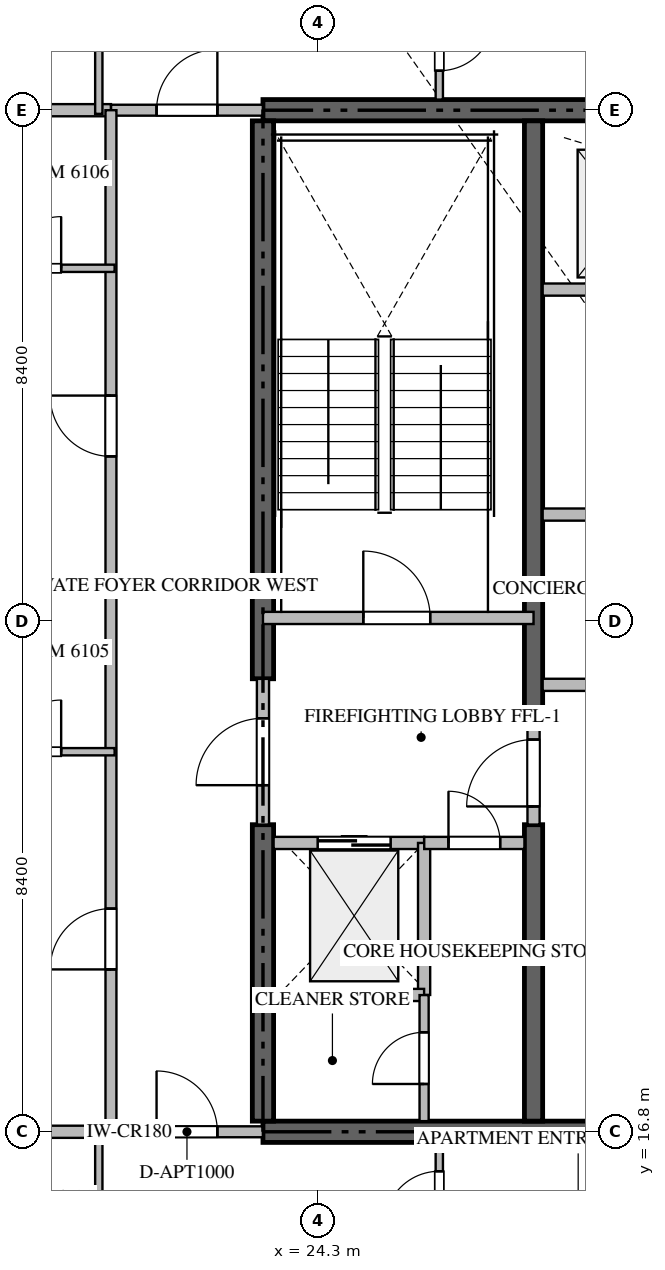
"""IFC4 building model, lengths in metres.
Left out: names, types, materials, properties, quantities, classifications, styles, units other than length and angle.
Written with IfcOpenShell. Run it as: python <this file> out.ifc"""

import sys

from ifc_helpers import new_model, si_unit, direction, frame, frame_2d, origin, place, context, subcontext, project, spatial, rectangle, extrude, source, transform, mapped, element, fill, save


model = new_model("IFC4")
c1 = context("Model", 3, precision=1e-05, world=origin(), true_north=direction((0.0, 1.0)))
c2 = subcontext(c1, "Body", "Model", "MODEL_VIEW")
j1 = project(units=[si_unit("LENGTHUNIT", "METRE"), si_unit("PLANEANGLEUNIT", "RADIAN")], contexts=[c1])
p1 = place(None, origin())
s1 = spatial("IfcSite", under=j1, at=p1, CompositionType="ELEMENT")
p2 = place(p1, origin())
s2 = spatial("IfcBuilding", under=s1, at=p2, CompositionType="ELEMENT")
p3 = place(p2, frame((0.0, 0.0, 245.1)))
s3 = spatial("IfcBuildingStorey", under=s2, at=p3, CompositionType="ELEMENT", Elevation=245.1)
for number, where, z_axis, x_axis in (
    (1, (23.4, 16.8, -0.26), (0.0, 0.0, 1.0), (1.0, 0.0, 0.0)),
    (2, (41.4, 33.6, -0.26), (0.0, 0.0, 1.0), (-1.0, 0.0, 0.0)),
):
    element("IfcWall", number, at=place(p3, frame(where, z_axis=z_axis, x_axis=x_axis)), inside=s3, PredefinedType="SHEAR", context=c2, shape_type="SweptSolid", body=[
        extrude(rectangle(XDim=18.0, YDim=0.35, at=frame_2d((9.0, 0.0))), origin(), (0.0, 0.0, 1.0), 3.848),
    ])
p4 = place(p3, frame((23.4, 16.975, -0.26), z_axis=(0.0, 0.0, 1.0), x_axis=(0.0, 1.0, 0.0)))
e3 = element("IfcWall", 3, at=p4, inside=s3, PredefinedType="SHEAR", context=c2, shape_type="SweptSolid", body=[
    extrude(rectangle(XDim=4.875, YDim=0.35, at=frame_2d((2.438, 0.0))), origin(), (0.0, 0.0, 1.0), 3.848),
])
p5 = place(p3, frame((23.4, 24.25, -0.26), z_axis=(0.0, 0.0, 1.0), x_axis=(0.0, 1.0, 0.0)))
e4 = element("IfcWall", 4, at=p5, inside=s3, PredefinedType="SHEAR", context=c2, shape_type="SweptSolid", body=[
    extrude(rectangle(XDim=9.175, YDim=0.35, at=frame_2d((4.587, 0.0))), origin(), (0.0, 0.0, 1.0), 3.848),
])
p6 = place(p3, frame((27.85, 16.975, -0.26), z_axis=(0.0, 0.0, 1.0), x_axis=(0.0, 1.0, 0.0)))
e5 = element("IfcWall", 5, at=p6, inside=s3, PredefinedType="SHEAR", context=c2, shape_type="SweptSolid", body=[
    extrude(rectangle(XDim=4.875, YDim=0.3, at=frame_2d((2.438, 0.0))), origin(), (0.0, 0.0, 1.0), 3.848),
])
p7 = place(p3, frame((27.85, 23.55, -0.26), z_axis=(0.0, 0.0, 1.0), x_axis=(0.0, 1.0, 0.0)))
e6 = element("IfcWall", 6, at=p7, inside=s3, PredefinedType="SHEAR", context=c2, shape_type="SweptSolid", body=[
    extrude(rectangle(XDim=9.875, YDim=0.3, at=frame_2d((4.938, 0.0))), origin(), (0.0, 0.0, 1.0), 3.848),
])
p8 = place(p3, frame((23.4, 25.25, 0.0), z_axis=(0.0, 0.0, 1.0), x_axis=(1.0, 0.0, 0.0)))
e7 = element("IfcWall", 7, at=p8, inside=s3, PredefinedType="STANDARD", context=c2, shape_type="SweptSolid", body=[
    extrude(rectangle(XDim=4.45, YDim=0.2, at=frame_2d((2.225, 0.0))), origin(), (0.0, 0.0, 1.0), 3.59),
])
p9 = place(p8, frame((1.65, 0.0, 0.0)))
e8 = element("IfcOpeningElement", 8, at=p9, cuts=e7, PredefinedType="OPENING", context=c2, shape_type="SweptSolid", body=[
    extrude(rectangle(XDim=1.1, YDim=2.15, at=frame_2d((0.55, 1.075))), frame((0.0, 0.11, 0.0), z_axis=(0.0, -1.0, 0.0), x_axis=(1.0, 0.0, 0.0)), (0.0, 0.0, 1.0), 0.22),
])
p10 = place(p3, frame((23.575, 21.55, 0.0), z_axis=(0.0, 0.0, 1.0), x_axis=(1.0, 0.0, 0.0)))
e9 = element("IfcWall", 9, at=p10, inside=s3, PredefinedType="STANDARD", context=c2, shape_type="SweptSolid", body=[
    extrude(rectangle(XDim=2.475, YDim=0.2, at=frame_2d((1.238, 0.0))), origin(), (0.0, 0.0, 1.0), 3.59),
])
p11 = place(p10, frame((0.725, 0.0, 0.0)))
e10 = element("IfcOpeningElement", 10, at=p11, cuts=e9, PredefinedType="OPENING", context=c2, shape_type="SweptSolid", body=[
    extrude(rectangle(XDim=1.2, YDim=2.2, at=frame_2d((0.6, 1.1))), frame((0.0, 0.11, 0.0), z_axis=(0.0, -1.0, 0.0), x_axis=(1.0, 0.0, 0.0)), (0.0, 0.0, 1.0), 0.22),
])
p12 = place(p3, frame((28.0, 30.65, 0.0), z_axis=(0.0, 0.0, 1.0), x_axis=(1.0, 0.0, 0.0)))
e11 = element("IfcWall", 11, at=p12, inside=s3, PredefinedType="STANDARD", context=c2, shape_type="SweptSolid", body=[
    extrude(rectangle(XDim=2.55, YDim=0.2, at=frame_2d((1.275, 0.0))), origin(), (0.0, 0.0, 1.0), 3.59),
])
p13 = place(p12, frame((0.85, 0.0, 0.0)))
e12 = element("IfcOpeningElement", 12, at=p13, cuts=e11, PredefinedType="OPENING", context=c2, shape_type="SweptSolid", body=[
    extrude(rectangle(XDim=1.1, YDim=2.2, at=frame_2d((0.55, 1.1))), frame((0.0, 0.11, 0.0), z_axis=(0.0, -1.0, 0.0), x_axis=(1.0, 0.0, 0.0)), (0.0, 0.0, 1.0), 0.22),
])
p14 = place(p3, frame((26.05, 19.05, 0.0), z_axis=(0.0, 0.0, 1.0), x_axis=(0.0, 1.0, 0.0)))
e13 = element("IfcWall", 13, at=p14, inside=s3, PredefinedType="STANDARD", context=c2, shape_type="SweptSolid", body=[
    extrude(rectangle(XDim=2.5, YDim=0.2, at=frame_2d((1.25, 0.0))), origin(), (0.0, 0.0, 1.0), 3.59),
])
p15 = place(p3, frame((23.575, 19.05, 0.0), z_axis=(0.0, 0.0, 1.0), x_axis=(1.0, 0.0, 0.0)))
e14 = element("IfcWall", 14, at=p15, inside=s3, PredefinedType="STANDARD", context=c2, shape_type="SweptSolid", body=[
    extrude(rectangle(XDim=2.475, YDim=0.2, at=frame_2d((1.238, 0.0))), origin(), (0.0, 0.0, 1.0), 3.59),
])
p16 = place(p3, frame((26.052, 21.55, 0.0), z_axis=(0.0, 0.0, 1.0), x_axis=(1.0, 0.0, 0.0)))
e15 = element("IfcWall", 15, at=p16, inside=s3, PredefinedType="STANDARD", context=c2, shape_type="SweptSolid", body=[
    extrude(rectangle(XDim=1.648, YDim=0.2, at=frame_2d((0.824, 0.0))), origin(), (0.0, 0.0, 1.0), 3.59),
])
p17 = place(p16, frame((0.399, 0.0, 0.0)))
e16 = element("IfcOpeningElement", 16, at=p17, cuts=e15, PredefinedType="OPENING", context=c2, shape_type="SweptSolid", body=[
    extrude(rectangle(XDim=0.85, YDim=2.1, at=frame_2d((0.425, 1.05))), frame((0.0, 0.11, 0.0), z_axis=(0.0, -1.0, 0.0), x_axis=(1.0, 0.0, 0.0)), (0.0, 0.0, 1.0), 0.22),
])
p18 = place(p3, frame((23.4, 21.852, 0.0), z_axis=(0.0, 0.0, 1.0), x_axis=(0.0, 1.0, 0.0)))
e17 = element("IfcWall", 17, at=p18, inside=s3, PredefinedType="STANDARD", context=c2, shape_type="SweptSolid", body=[
    extrude(rectangle(XDim=2.396, YDim=0.2, at=frame_2d((1.198, 0.0))), origin(), (0.0, 0.0, 1.0), 3.59),
])
p19 = place(p18, frame((0.648, 0.0, 0.0)))
e18 = element("IfcOpeningElement", 18, at=p19, cuts=e17, PredefinedType="OPENING", context=c2, shape_type="SweptSolid", body=[
    extrude(rectangle(XDim=1.1, YDim=2.15, at=frame_2d((0.55, 1.075))), frame((0.0, 0.11, 0.0), z_axis=(0.0, -1.0, 0.0), x_axis=(1.0, 0.0, 0.0)), (0.0, 0.0, 1.0), 0.22),
])
p20 = place(p3, frame((27.85, 21.852, 0.0), z_axis=(0.0, 0.0, 1.0), x_axis=(0.0, 1.0, 0.0)))
e19 = element("IfcWall", 19, at=p20, inside=s3, PredefinedType="STANDARD", context=c2, shape_type="SweptSolid", body=[
    extrude(rectangle(XDim=1.696, YDim=0.2, at=frame_2d((0.848, 0.0))), origin(), (0.0, 0.0, 1.0), 3.59),
])
p21 = place(p20, frame((0.298, 0.0, 0.0)))
e20 = element("IfcOpeningElement", 20, at=p21, cuts=e19, PredefinedType="OPENING", context=c2, shape_type="SweptSolid", body=[
    extrude(rectangle(XDim=1.1, YDim=2.15, at=frame_2d((0.55, 1.075))), frame((0.0, 0.11, 0.0), z_axis=(0.0, -1.0, 0.0), x_axis=(1.0, 0.0, 0.0)), (0.0, 0.0, 1.0), 0.22),
])
p22 = place(p3, frame((26.05, 16.975, 0.0), z_axis=(0.0, 0.0, 1.0), x_axis=(0.0, 1.0, 0.0)))
e21 = element("IfcWall", 21, at=p22, inside=s3, PredefinedType="PARTITIONING", context=c2, shape_type="SweptSolid", body=[
    extrude(rectangle(XDim=2.073, YDim=0.15, at=frame_2d((1.037, 0.0))), origin(), (0.0, 0.0, 1.0), 3.59),
])
p23 = place(p22, frame((0.611, 0.0, 0.0)))
e22 = element("IfcOpeningElement", 22, at=p23, cuts=e21, PredefinedType="OPENING", context=c2, shape_type="SweptSolid", body=[
    extrude(rectangle(XDim=0.85, YDim=2.1, at=frame_2d((0.425, 1.05))), frame((0.0, 0.085, 0.0), z_axis=(0.0, -1.0, 0.0), x_axis=(1.0, 0.0, 0.0)), (0.0, 0.0, 1.0), 0.17),
])
p24 = place(p3, frame((28.0, 19.75, 0.0), z_axis=(0.0, 0.0, 1.0), x_axis=(1.0, 0.0, 0.0)))
e23 = element("IfcWall", 23, at=p24, inside=s3, PredefinedType="STANDARD", context=c2, shape_type="SweptSolid", body=[
    extrude(rectangle(XDim=8.8, YDim=0.2, at=frame_2d((4.4, 0.0))), origin(), (0.0, 0.0, 1.0), 3.59),
])
p25 = place(p24, frame((3.95, 0.0, 0.0)))
e24 = element("IfcOpeningElement", 24, at=p25, cuts=e23, PredefinedType="OPENING", context=c2, shape_type="SweptSolid", body=[
    extrude(rectangle(XDim=0.9, YDim=2.1, at=frame_2d((0.45, 1.05))), frame((0.0, 0.11, 0.0), z_axis=(0.0, -1.0, 0.0), x_axis=(1.0, 0.0, 0.0)), (0.0, 0.0, 1.0), 0.22),
])
p26 = place(p3, frame((28.0, 26.95, 0.0), z_axis=(0.0, 0.0, 1.0), x_axis=(1.0, 0.0, 0.0)))
e25 = element("IfcWall", 25, at=p26, inside=s3, PredefinedType="STANDARD", context=c2, shape_type="SweptSolid", body=[
    extrude(rectangle(XDim=6.95, YDim=0.2, at=frame_2d((3.475, 0.0))), origin(), (0.0, 0.0, 1.0), 3.59),
])
p27 = place(p3, frame((28.0, 24.15, 0.0), z_axis=(0.0, 0.0, 1.0), x_axis=(1.0, 0.0, 0.0)))
e26 = element("IfcWall", 26, at=p27, inside=s3, PredefinedType="STANDARD", context=c2, shape_type="SweptSolid", body=[
    extrude(rectangle(XDim=3.45, YDim=0.2, at=frame_2d((1.725, 0.0))), origin(), (0.0, 0.0, 1.0), 3.59),
])
p28 = place(p27, frame((1.3, 0.0, 0.0)))
e27 = element("IfcOpeningElement", 27, at=p28, cuts=e26, PredefinedType="OPENING", context=c2, shape_type="SweptSolid", body=[
    extrude(rectangle(XDim=0.85, YDim=2.1, at=frame_2d((0.425, 1.05))), frame((0.0, 0.11, 0.0), z_axis=(0.0, -1.0, 0.0), x_axis=(1.0, 0.0, 0.0)), (0.0, 0.0, 1.0), 0.22),
])
p29 = place(p3, frame((7.482, 25.8, 0.0), z_axis=(0.0, 0.0, 1.0), x_axis=(1.0, 0.0, 0.0)))
e28 = element("IfcWall", 28, at=p29, inside=s3, PredefinedType="PARTITIONING", context=c2, shape_type="SweptSolid", body=[
    extrude(rectangle(XDim=13.538, YDim=0.2, at=frame_2d((6.769, 0.0))), origin(), (0.0, 0.0, 1.0), 3.59),
])
for number, where, z_axis, x_axis in (
    (29, (7.482, 16.8, 0.0), (0.0, 0.0, 1.0), (1.0, 0.0, 0.0)),
    (30, (7.482, 33.6, 0.0), (0.0, 0.0, 1.0), (1.0, 0.0, 0.0)),
):
    element("IfcWall", number, at=place(p3, frame(where, z_axis=z_axis, x_axis=x_axis)), inside=s3, PredefinedType="PARTITIONING", context=c2, shape_type="SweptSolid", body=[
        extrude(rectangle(XDim=13.418, YDim=0.2, at=frame_2d((6.709, 0.0))), origin(), (0.0, 0.0, 1.0), 3.59),
    ])
p30 = place(p3, frame((20.902, 16.8, 0.0), z_axis=(0.0, 0.0, 1.0), x_axis=(1.0, 0.0, 0.0)))
e31 = element("IfcWall", 31, at=p30, inside=s3, PredefinedType="PARTITIONING", context=c2, shape_type="SweptSolid", body=[
    extrude(rectangle(XDim=2.496, YDim=0.18, at=frame_2d((1.248, 0.0))), origin(), (0.0, 0.0, 1.0), 3.59),
])
p31 = place(p30, frame((0.748, 0.0, 0.0)))
e32 = element("IfcOpeningElement", 32, at=p31, cuts=e31, PredefinedType="OPENING", context=c2, shape_type="SweptSolid", body=[
    extrude(rectangle(XDim=1.0, YDim=2.15, at=frame_2d((0.5, 1.075))), frame((0.0, 0.1, 0.0), z_axis=(0.0, -1.0, 0.0), x_axis=(1.0, 0.0, 0.0)), (0.0, 0.0, 1.0), 0.2),
])
p32 = place(p3, frame((20.902, 33.6, 0.0), z_axis=(0.0, 0.0, 1.0), x_axis=(1.0, 0.0, 0.0)))
e33 = element("IfcWall", 33, at=p32, inside=s3, PredefinedType="PARTITIONING", context=c2, shape_type="SweptSolid", body=[
    extrude(rectangle(XDim=2.496, YDim=0.18, at=frame_2d((1.248, 0.0))), origin(), (0.0, 0.0, 1.0), 3.59),
])
p33 = place(p32, frame((0.748, 0.0, 0.0)))
e34 = element("IfcOpeningElement", 34, at=p33, cuts=e33, PredefinedType="OPENING", context=c2, shape_type="SweptSolid", body=[
    extrude(rectangle(XDim=1.0, YDim=2.15, at=frame_2d((0.5, 1.075))), frame((0.0, 0.1, 0.0), z_axis=(0.0, -1.0, 0.0), x_axis=(1.0, 0.0, 0.0)), (0.0, 0.0, 1.0), 0.2),
])
p34 = place(p3, frame((20.9, 16.8, 0.0), z_axis=(0.0, 0.0, 1.0), x_axis=(0.0, 1.0, 0.0)))
e35 = element("IfcWall", 35, at=p34, inside=s3, PredefinedType="PARTITIONING", context=c2, shape_type="SweptSolid", body=[
    extrude(rectangle(XDim=16.8, YDim=0.18, at=frame_2d((8.4, 0.0))), origin(), (0.0, 0.0, 1.0), 3.59),
])
p35 = place(p34, frame((2.67, 0.0, 0.0)))
e36 = element("IfcOpeningElement", 36, at=p35, cuts=e35, PredefinedType="OPENING", context=c2, shape_type="SweptSolid", body=[
    extrude(rectangle(XDim=1.0, YDim=2.15, at=frame_2d((0.5, 1.075))), frame((0.0, 0.1, 0.0), z_axis=(0.0, -1.0, 0.0), x_axis=(1.0, 0.0, 0.0)), (0.0, 0.0, 1.0), 0.2),
])
p36 = place(p34, frame((11.107, 0.0, 0.0)))
e37 = element("IfcOpeningElement", 37, at=p36, cuts=e35, PredefinedType="OPENING", context=c2, shape_type="SweptSolid", body=[
    extrude(rectangle(XDim=1.0, YDim=2.15, at=frame_2d((0.5, 1.075))), frame((0.0, 0.1, 0.0), z_axis=(0.0, -1.0, 0.0), x_axis=(1.0, 0.0, 0.0)), (0.0, 0.0, 1.0), 0.2),
])
p37 = place(p3, frame((20.7, 14.05, 0.0), z_axis=(0.0, 0.0, 1.0), x_axis=(0.0, 1.0, 0.0)))
e38 = element("IfcWall", 38, at=p37, inside=s3, PredefinedType="PARTITIONING", context=c2, shape_type="SweptSolid", body=[
    extrude(rectangle(XDim=2.81, YDim=0.12, at=frame_2d((1.405, 0.0))), origin(), (0.0, 0.0, 1.0), 3.59),
])
p38 = place(p3, frame((26.3, 14.65, 0.0), z_axis=(0.0, 0.0, 1.0), x_axis=(0.0, 1.0, 0.0)))
e39 = element("IfcWall", 39, at=p38, inside=s3, PredefinedType="PARTITIONING", context=c2, shape_type="SweptSolid", body=[
    extrude(rectangle(XDim=1.975, YDim=0.12, at=frame_2d((0.988, 0.0))), origin(), (0.0, 0.0, 1.0), 3.59),
])
p39 = place(p38, frame((0.601, 0.0, 0.0)))
e40 = element("IfcOpeningElement", 40, at=p39, cuts=e39, PredefinedType="OPENING", context=c2, shape_type="SweptSolid", body=[
    extrude(rectangle(XDim=0.9, YDim=2.1, at=frame_2d((0.45, 1.05))), frame((0.0, 0.07, 0.0), z_axis=(0.0, -1.0, 0.0), x_axis=(1.0, 0.0, 0.0)), (0.0, 0.0, 1.0), 0.14),
])
p40 = place(p3, frame((20.7, 36.35, 0.0), z_axis=(0.0, 0.0, 1.0), x_axis=(0.0, -1.0, 0.0)))
e41 = element("IfcWall", 41, at=p40, inside=s3, PredefinedType="PARTITIONING", context=c2, shape_type="SweptSolid", body=[
    extrude(rectangle(XDim=2.81, YDim=0.12, at=frame_2d((1.405, 0.0))), origin(), (0.0, 0.0, 1.0), 3.59),
])
p41 = place(p3, frame((26.3, 35.75, 0.0), z_axis=(0.0, 0.0, 1.0), x_axis=(0.0, -1.0, 0.0)))
e42 = element("IfcWall", 42, at=p41, inside=s3, PredefinedType="PARTITIONING", context=c2, shape_type="SweptSolid", body=[
    extrude(rectangle(XDim=1.975, YDim=0.12, at=frame_2d((0.988, 0.0))), origin(), (0.0, 0.0, 1.0), 3.59),
])
p42 = place(p41, frame((0.601, 0.0, 0.0)))
e43 = element("IfcOpeningElement", 43, at=p42, cuts=e42, PredefinedType="OPENING", context=c2, shape_type="SweptSolid", body=[
    extrude(rectangle(XDim=0.9, YDim=2.1, at=frame_2d((0.45, 1.05))), frame((0.0, 0.07, 0.0), z_axis=(0.0, -1.0, 0.0), x_axis=(1.0, 0.0, 0.0)), (0.0, 0.0, 1.0), 0.14),
])
p43 = place(p3, frame((18.352, 23.05, 0.0), z_axis=(0.0, 0.0, 1.0), x_axis=(1.0, 0.0, 0.0)))
e44 = element("IfcWall", 44, at=p43, inside=s3, PredefinedType="PARTITIONING", context=c2, shape_type="SweptSolid", body=[
    extrude(rectangle(XDim=2.608, YDim=0.12, at=frame_2d((1.304, 0.0))), origin(), (0.0, 0.0, 1.0), 3.59),
])
p44 = place(p43, frame((0.879, 0.0, 0.0)))
e45 = element("IfcOpeningElement", 45, at=p44, cuts=e44, PredefinedType="OPENING", context=c2, shape_type="SweptSolid", body=[
    extrude(rectangle(XDim=0.85, YDim=2.1, at=frame_2d((0.425, 1.05))), frame((0.0, 0.07, 0.0), z_axis=(0.0, -1.0, 0.0), x_axis=(1.0, 0.0, 0.0)), (0.0, 0.0, 1.0), 0.14),
])
p45 = place(p3, frame((18.352, 31.0, 0.0), z_axis=(0.0, 0.0, 1.0), x_axis=(1.0, 0.0, 0.0)))
e46 = element("IfcWall", 46, at=p45, inside=s3, PredefinedType="PARTITIONING", context=c2, shape_type="SweptSolid", body=[
    extrude(rectangle(XDim=2.608, YDim=0.12, at=frame_2d((1.304, 0.0))), origin(), (0.0, 0.0, 1.0), 3.59),
])
p46 = place(p45, frame((0.879, 0.0, 0.0)))
e47 = element("IfcOpeningElement", 47, at=p46, cuts=e46, PredefinedType="OPENING", context=c2, shape_type="SweptSolid", body=[
    extrude(rectangle(XDim=0.85, YDim=2.1, at=frame_2d((0.425, 1.05))), frame((0.0, 0.07, 0.0), z_axis=(0.0, -1.0, 0.0), x_axis=(1.0, 0.0, 0.0)), (0.0, 0.0, 1.0), 0.14),
])
m1 = source(origin(), c2, "Body", "SweptSolid", [
    extrude(rectangle(XDim=1.1, YDim=2.15, at=frame_2d((0.55, 1.075))), frame((0.0, 0.025, 0.0), z_axis=(0.0, -1.0, 0.0), x_axis=(1.0, 0.0, 0.0)), (0.0, 0.0, 1.0), 0.05),
])
p47 = place(p9, origin())
e48 = element("IfcDoor", 48, at=p47, inside=s3, OperationType="SINGLE_SWING_LEFT", PredefinedType="DOOR", context=c2, shape_type="MappedRepresentation", body=[
    mapped(m1, transform((0.0, 0.0, 0.0), scale=1.0)),
])
fill(e8, e48)
m2 = source(origin(), c2, "Body", "SweptSolid", [
    extrude(rectangle(XDim=1.2, YDim=2.2, at=frame_2d((0.6, 1.1))), frame((0.0, 0.025, 0.0), z_axis=(0.0, -1.0, 0.0), x_axis=(1.0, 0.0, 0.0)), (0.0, 0.0, 1.0), 0.05),
])
p48 = place(p11, origin())
e49 = element("IfcDoor", 49, at=p48, inside=s3, OperationType="DOUBLE_DOOR_SLIDING", PredefinedType="DOOR", context=c2, shape_type="MappedRepresentation", body=[
    mapped(m2, transform((0.0, 0.0, 0.0), scale=1.0)),
])
fill(e10, e49)
m3 = source(origin(), c2, "Body", "SweptSolid", [
    extrude(rectangle(XDim=0.85, YDim=2.1, at=frame_2d((0.425, 1.05))), frame((0.0, 0.025, 0.0), z_axis=(0.0, -1.0, 0.0), x_axis=(1.0, 0.0, 0.0)), (0.0, 0.0, 1.0), 0.05),
])
p49 = place(p17, origin())
e50 = element("IfcDoor", 50, at=p49, inside=s3, OperationType="SINGLE_SWING_LEFT", PredefinedType="DOOR", context=c2, shape_type="MappedRepresentation", body=[
    mapped(m3, transform((0.0, 0.0, 0.0), scale=1.0)),
])
fill(e16, e50)
p50 = place(p19, origin())
e51 = element("IfcDoor", 51, at=p50, inside=s3, OperationType="SINGLE_SWING_LEFT", PredefinedType="DOOR", context=c2, shape_type="MappedRepresentation", body=[
    mapped(m1, transform((0.0, 0.0, 0.0), scale=1.0)),
])
fill(e18, e51)
p51 = place(p21, origin())
e52 = element("IfcDoor", 52, at=p51, inside=s3, OperationType="SINGLE_SWING_LEFT", PredefinedType="DOOR", context=c2, shape_type="MappedRepresentation", body=[
    mapped(m1, transform((0.0, 0.0, 0.0), scale=1.0)),
])
fill(e20, e52)
p52 = place(p23, origin())
e53 = element("IfcDoor", 53, at=p52, inside=s3, OperationType="SINGLE_SWING_LEFT", PredefinedType="DOOR", context=c2, shape_type="MappedRepresentation", body=[
    mapped(m3, transform((0.0, 0.0, 0.0), scale=1.0)),
])
fill(e22, e53)
m4 = source(origin(), c2, "Body", "SweptSolid", [
    extrude(rectangle(XDim=1.0, YDim=2.15, at=frame_2d((0.5, 1.075))), frame((0.0, 0.025, 0.0), z_axis=(0.0, -1.0, 0.0), x_axis=(1.0, 0.0, 0.0)), (0.0, 0.0, 1.0), 0.05),
])
p53 = place(p31, origin())
e54 = element("IfcDoor", 54, at=p53, inside=s3, OperationType="SINGLE_SWING_LEFT", PredefinedType="DOOR", context=c2, shape_type="MappedRepresentation", body=[
    mapped(m4, transform((0.0, 0.0, 0.0), scale=1.0)),
])
fill(e32, e54)
p54 = place(p33, origin())
e55 = element("IfcDoor", 55, at=p54, inside=s3, OperationType="SINGLE_SWING_RIGHT", PredefinedType="DOOR", context=c2, shape_type="MappedRepresentation", body=[
    mapped(m4, transform((0.0, 0.0, 0.0), scale=1.0)),
])
fill(e34, e55)
p55 = place(p35, origin())
e56 = element("IfcDoor", 56, at=p55, inside=s3, OperationType="SINGLE_SWING_LEFT", PredefinedType="DOOR", context=c2, shape_type="MappedRepresentation", body=[
    mapped(m4, transform((0.0, 0.0, 0.0), scale=1.0)),
])
fill(e36, e56)
p56 = place(p36, origin())
e57 = element("IfcDoor", 57, at=p56, inside=s3, OperationType="SINGLE_SWING_RIGHT", PredefinedType="DOOR", context=c2, shape_type="MappedRepresentation", body=[
    mapped(m4, transform((0.0, 0.0, 0.0), scale=1.0)),
])
fill(e37, e57)
m5 = source(origin(), c2, "Body", "SweptSolid", [
    extrude(rectangle(XDim=0.9, YDim=2.1, at=frame_2d((0.45, 1.05))), frame((0.0, 0.025, 0.0), z_axis=(0.0, -1.0, 0.0), x_axis=(1.0, 0.0, 0.0)), (0.0, 0.0, 1.0), 0.05),
])
p57 = place(p39, origin())
e58 = element("IfcDoor", 58, at=p57, inside=s3, OperationType="SINGLE_SWING_LEFT", PredefinedType="DOOR", context=c2, shape_type="MappedRepresentation", body=[
    mapped(m5, transform((0.0, 0.0, 0.0), scale=1.0)),
])
fill(e40, e58)
p58 = place(p42, origin())
e59 = element("IfcDoor", 59, at=p58, inside=s3, OperationType="SINGLE_SWING_LEFT", PredefinedType="DOOR", context=c2, shape_type="MappedRepresentation", body=[
    mapped(m5, transform((0.0, 0.0, 0.0), scale=1.0)),
])
fill(e43, e59)
p59 = place(p44, origin())
e60 = element("IfcDoor", 60, at=p59, inside=s3, OperationType="SINGLE_SWING_RIGHT", PredefinedType="DOOR", context=c2, shape_type="MappedRepresentation", body=[
    mapped(m3, transform((0.0, 0.0, 0.0), scale=1.0)),
])
fill(e45, e60)
p60 = place(p46, origin())
e61 = element("IfcDoor", 61, at=p60, inside=s3, OperationType="SINGLE_SWING_RIGHT", PredefinedType="DOOR", context=c2, shape_type="MappedRepresentation", body=[
    mapped(m3, transform((0.0, 0.0, 0.0), scale=1.0)),
])
fill(e47, e61)
save(model, sys.argv[1])
